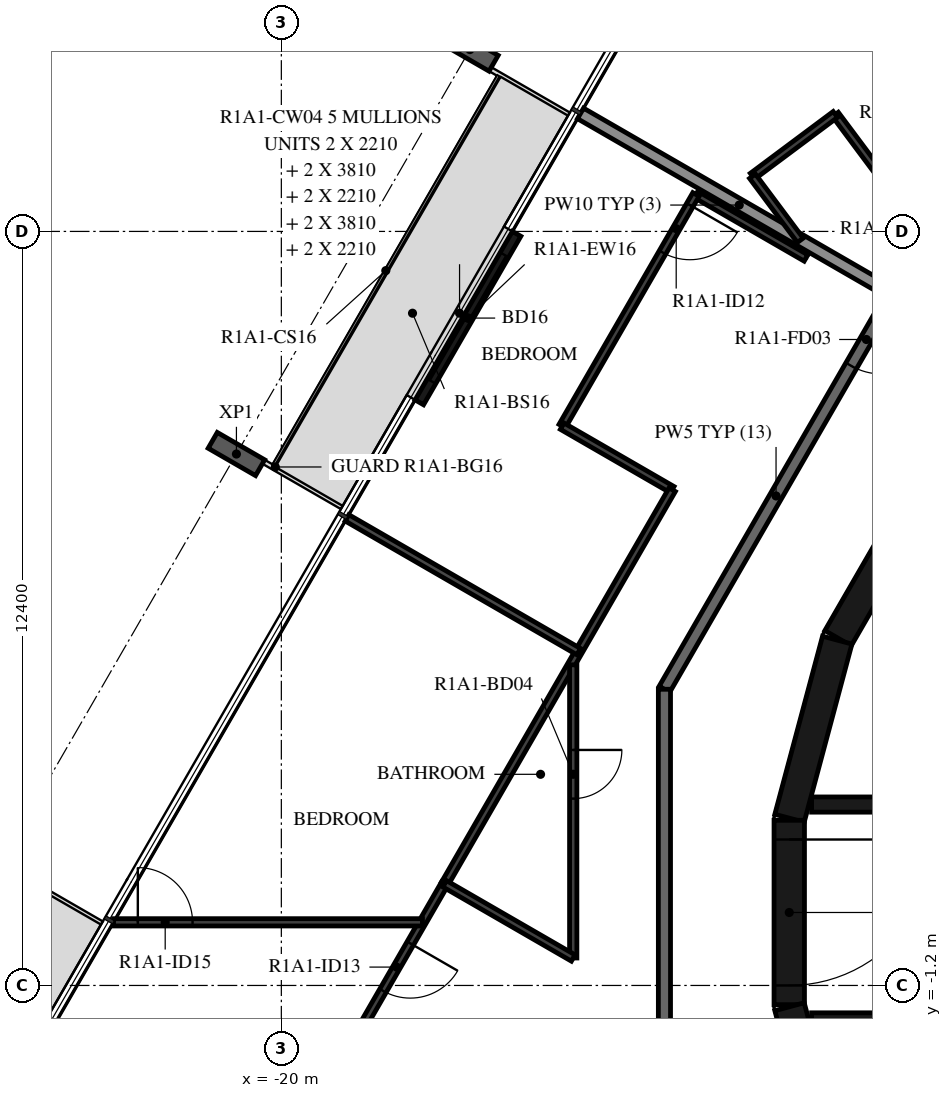
"""IFC4 building model, lengths in metres.
Left out: names, types, materials, properties, quantities, classifications, styles, units other than length and angle.
Written with IfcOpenShell. Run it as: python <this file> out.ifc"""

import sys

from ifc_helpers import new_model, si_unit, direction, frame, frame_2d, origin, origin_2d, place, context, subcontext, project, spatial, rectangle, i_section, extrude, element, fill, save


model = new_model("IFC4")
c1 = context("Model", 3, precision=1e-05, world=origin(), true_north=direction((0.0, 1.0)))
c2 = subcontext(c1, "Body", "Model", "MODEL_VIEW")
j1 = project(units=[si_unit("LENGTHUNIT", "METRE"), si_unit("PLANEANGLEUNIT", "RADIAN")], contexts=[c1])
p1 = place(None, origin())
s1 = spatial("IfcSite", under=j1, at=p1, CompositionType="ELEMENT")
p2 = place(p1, origin())
s2 = spatial("IfcBuilding", under=s1, at=p2, CompositionType="ELEMENT")
p3 = place(p2, frame((0.0, 0.0, 41.9)))
s3 = spatial("IfcBuildingStorey", under=s2, at=p3, CompositionType="ELEMENT", Elevation=41.9)
for number, where, z_axis, x_axis in (
    (1, (-16.899, 14.19, -0.38), (0.0, 0.0, 1.0), (0.5, 0.866, 0.0)),
    (2, (-20.739, 7.539, -0.38), (0.0, 0.0, 1.0), (0.5, 0.866, 0.0)),
):
    element("IfcColumn", number, at=place(p3, frame(where, z_axis=z_axis, x_axis=x_axis)), inside=s3, PredefinedType="COLUMN", context=c2, shape_type="SweptSolid", body=[
        extrude(i_section(OverallWidth=0.3, OverallDepth=0.9, WebThickness=0.019, FlangeThickness=0.035, FilletRadius=0.03, at=origin_2d()), origin(), (0.0, 0.0, 1.0), 3.5),
    ])
p4 = place(p3, frame((-16.131, 11.161, 0.0), z_axis=(0.0, 0.0, 1.0), x_axis=(-0.500028443584, -0.866008981251, 0.0)))
e3 = element("IfcWall", 3, at=p4, inside=s3, PredefinedType="STANDARD", context=c2, shape_type="SweptSolid", body=[
    extrude(rectangle(XDim=3.2, YDim=0.16, at=frame_2d((1.6, 0.0))), origin(), (0.0, 0.0, 1.0), 3.12),
])
p5 = place(p4, frame((0.4, 0.0, 0.0)))
e4 = element("IfcOpeningElement", 4, at=p5, cuts=e3, PredefinedType="OPENING", context=c2, shape_type="SweptSolid", body=[
    extrude(rectangle(XDim=2.4, YDim=2.4, at=frame_2d((1.2, 1.2))), frame((0.0, 0.09, 0.0), z_axis=(0.0, -1.0, 0.0), x_axis=(1.0, 0.0, 0.0)), (0.0, 0.0, 1.0), 0.18),
])
for number, where, z_axis, x_axis in (
    (5, (-9.329, 7.137, 0.0), (0.0, 0.0, 1.0), (-0.5, -0.866, 0.0)),
    (6, (-10.858, 4.479, 0.0), (0.0, 0.0, 1.0), (-0.259, -0.966, 0.0)),
):
    element("IfcWall", number, at=place(p3, frame(where, z_axis=z_axis, x_axis=x_axis)), inside=s3, PredefinedType="SHEAR", context=c2, shape_type="SweptSolid", body=[
        extrude(rectangle(XDim=3.033, YDim=0.5, at=frame_2d((1.516, 0.0))), origin(), (0.0, 0.0, 1.0), 3.12),
    ])
p6 = place(p3, frame((-11.647, 1.516, 0.0), z_axis=(0.0, 0.0, 1.0), x_axis=(0.0, -1.0, 0.0)))
e7 = element("IfcWall", 7, at=p6, inside=s3, PredefinedType="SHEAR", context=c2, shape_type="SweptSolid", body=[
    extrude(rectangle(XDim=3.033, YDim=0.5, at=frame_2d((1.516, 0.0))), origin(), (0.0, 0.0, 1.0), 3.12),
])
p7 = place(p6, frame((0.316, 0.0, 0.0)))
e8 = element("IfcOpeningElement", 8, at=p7, cuts=e7, PredefinedType="OPENING", context=c2, shape_type="SweptSolid", body=[
    extrude(rectangle(XDim=2.4, YDim=2.1, at=frame_2d((1.2, 1.05))), frame((0.0, 0.26, 0.0), z_axis=(0.0, -1.0, 0.0), x_axis=(1.0, 0.0, 0.0)), (0.0, 0.0, 1.0), 0.52),
])
p8 = place(p3, frame((-11.643, -1.55, 0.0), z_axis=(0.0, 0.0, 1.0), x_axis=(0.258734743916, -0.965948410781, 0.0)))
e9 = element("IfcWall", 9, at=p8, inside=s3, PredefinedType="SHEAR", context=c2, shape_type="SweptSolid", body=[
    extrude(rectangle(XDim=3.033, YDim=0.5, at=frame_2d((1.516, 0.0))), origin(), (0.0, 0.0, 1.0), 3.12),
])
p9 = place(p8, frame((1.066, 0.0, 0.0)))
e10 = element("IfcOpeningElement", 10, at=p9, cuts=e9, PredefinedType="OPENING", context=c2, shape_type="SweptSolid", body=[
    extrude(rectangle(XDim=0.9, YDim=2.1, at=frame_2d((0.45, 1.05))), frame((0.0, 0.26, 0.0), z_axis=(0.0, -1.0, 0.0), x_axis=(1.0, 0.0, 0.0)), (0.0, 0.0, 1.0), 0.52),
])
p10 = place(p3, frame((-11.28, 1.775, 0.0), z_axis=(0.0, 0.0, 1.0), x_axis=(1.0, 0.0, 0.0)))
e11 = element("IfcWall", 11, at=p10, inside=s3, PredefinedType="SHEAR", context=c2, shape_type="SweptSolid", body=[
    extrude(rectangle(XDim=14.38, YDim=0.25, at=frame_2d((7.19, 0.0))), origin(), (0.0, 0.0, 1.0), 3.12),
])
p11 = place(p10, frame((2.13, 0.0, 0.0)))
e12 = element("IfcOpeningElement", 12, at=p11, cuts=e11, PredefinedType="OPENING", context=c2, shape_type="SweptSolid", body=[
    extrude(rectangle(XDim=1.1, YDim=2.1, at=frame_2d((0.55, 1.05))), frame((0.0, 0.135, 0.0), z_axis=(0.0, -1.0, 0.0), x_axis=(1.0, 0.0, 0.0)), (0.0, 0.0, 1.0), 0.27),
])
p12 = place(p10, frame((4.28, 0.0, 0.0)))
e13 = element("IfcOpeningElement", 13, at=p12, cuts=e11, PredefinedType="OPENING", context=c2, shape_type="SweptSolid", body=[
    extrude(rectangle(XDim=1.1, YDim=2.1, at=frame_2d((0.55, 1.05))), frame((0.0, 0.135, 0.0), z_axis=(0.0, -1.0, 0.0), x_axis=(1.0, 0.0, 0.0)), (0.0, 0.0, 1.0), 0.27),
])
p13 = place(p10, frame((6.43, 0.0, 0.0)))
e14 = element("IfcOpeningElement", 14, at=p13, cuts=e11, PredefinedType="OPENING", context=c2, shape_type="SweptSolid", body=[
    extrude(rectangle(XDim=1.1, YDim=2.1, at=frame_2d((0.55, 1.05))), frame((0.0, 0.135, 0.0), z_axis=(0.0, -1.0, 0.0), x_axis=(1.0, 0.0, 0.0)), (0.0, 0.0, 1.0), 0.27),
])
p14 = place(p10, frame((8.58, 0.0, 0.0)))
e15 = element("IfcOpeningElement", 15, at=p14, cuts=e11, PredefinedType="OPENING", context=c2, shape_type="SweptSolid", body=[
    extrude(rectangle(XDim=1.1, YDim=2.1, at=frame_2d((0.55, 1.05))), frame((0.0, 0.135, 0.0), z_axis=(0.0, -1.0, 0.0), x_axis=(1.0, 0.0, 0.0)), (0.0, 0.0, 1.0), 0.27),
])
p15 = place(p10, frame((10.83, 0.0, 0.0)))
e16 = element("IfcOpeningElement", 16, at=p15, cuts=e11, PredefinedType="OPENING", context=c2, shape_type="SweptSolid", body=[
    extrude(rectangle(XDim=0.9, YDim=2.1, at=frame_2d((0.45, 1.05))), frame((0.0, 0.135, 0.0), z_axis=(0.0, -1.0, 0.0), x_axis=(1.0, 0.0, 0.0)), (0.0, 0.0, 1.0), 0.27),
])
p16 = place(p10, frame((12.98, 0.0, 0.0)))
e17 = element("IfcOpeningElement", 17, at=p16, cuts=e11, PredefinedType="OPENING", context=c2, shape_type="SweptSolid", body=[
    extrude(rectangle(XDim=0.9, YDim=2.1, at=frame_2d((0.45, 1.05))), frame((0.0, 0.135, 0.0), z_axis=(0.0, -1.0, 0.0), x_axis=(1.0, 0.0, 0.0)), (0.0, 0.0, 1.0), 0.27),
])
p17 = place(p3, frame((-11.28, -1.775, 0.0), z_axis=(0.0, 0.0, 1.0), x_axis=(1.0, 0.0, 0.0)))
e18 = element("IfcWall", 18, at=p17, inside=s3, PredefinedType="SHEAR", context=c2, shape_type="SweptSolid", body=[
    extrude(rectangle(XDim=14.38, YDim=0.25, at=frame_2d((7.19, 0.0))), origin(), (0.0, 0.0, 1.0), 3.12),
])
p18 = place(p17, frame((9.755, 0.0, 0.0)))
e19 = element("IfcOpeningElement", 19, at=p18, cuts=e18, PredefinedType="OPENING", context=c2, shape_type="SweptSolid", body=[
    extrude(rectangle(XDim=0.9, YDim=2.1, at=frame_2d((0.45, 1.05))), frame((0.0, 0.135, 0.0), z_axis=(0.0, -1.0, 0.0), x_axis=(1.0, 0.0, 0.0)), (0.0, 0.0, 1.0), 0.27),
])
p19 = place(p3, frame((-10.029, 10.029, 0.0), z_axis=(0.0, 0.0, 1.0), x_axis=(-0.500001669485, -0.866024439905, 0.0)))
e20 = element("IfcWall", 20, at=p19, inside=s3, PredefinedType="STANDARD", context=c2, shape_type="SweptSolid", body=[
    extrude(rectangle(XDim=7.342, YDim=0.2, at=frame_2d((3.671, 0.0))), origin(), (0.0, 0.0, 1.0), 3.12),
])
p20 = place(p19, frame((0.2, 0.0, 0.0)))
e21 = element("IfcOpeningElement", 21, at=p20, cuts=e20, PredefinedType="OPENING", context=c2, shape_type="SweptSolid", body=[
    extrude(rectangle(XDim=1.0, YDim=2.1, at=frame_2d((0.5, 1.05))), frame((0.0, 0.11, 0.0), z_axis=(0.0, -1.0, 0.0), x_axis=(1.0, 0.0, 0.0)), (0.0, 0.0, 1.0), 0.22),
])
p21 = place(p3, frame((-13.7, 3.671, 0.0), z_axis=(0.0, 0.0, 1.0), x_axis=(0.0, -1.0, 0.0)))
e22 = element("IfcWall", 22, at=p21, inside=s3, PredefinedType="STANDARD", context=c2, shape_type="SweptSolid", body=[
    extrude(rectangle(XDim=7.342, YDim=0.2, at=frame_2d((3.671, 0.0))), origin(), (0.0, 0.0, 1.0), 3.12),
])
p22 = place(p3, frame((-15.08, 13.14, 0.0), z_axis=(0.0, 0.0, 1.0), x_axis=(0.86603112331, -0.49999009336, 0.0)))
e23 = element("IfcWall", 23, at=p22, inside=s3, PredefinedType="STANDARD", context=c2, shape_type="SweptSolid", body=[
    extrude(rectangle(XDim=6.027, YDim=0.2, at=frame_2d((3.014, 0.0))), origin(), (0.0, 0.0, 1.0), 2.73),
])
p23 = place(p3, frame((-9.92, 11.824, 0.0), z_axis=(0.0, 0.0, 1.0), x_axis=(-0.597853402964, 0.801605456921, 0.0)))
e24 = element("IfcWall", 24, at=p23, inside=s3, PredefinedType="PARTITIONING", context=c2, shape_type="SweptSolid", body=[
    extrude(rectangle(XDim=1.621, YDim=0.12, at=frame_2d((0.811, 0.0))), origin(), (0.0, 0.0, 1.0), 3.12),
])
p24 = place(p3, frame((-10.889, 13.124, 0.0), z_axis=(0.0, 0.0, 1.0), x_axis=(-0.801616976804, -0.597837956724, 0.0)))
e25 = element("IfcWall", 25, at=p24, inside=s3, PredefinedType="PARTITIONING", context=c2, shape_type="SweptSolid", body=[
    extrude(rectangle(XDim=1.7, YDim=0.12, at=frame_2d((0.85, 0.0))), origin(), (0.0, 0.0, 1.0), 3.12),
])
p25 = place(p3, frame((-12.252, 12.107, 0.0), z_axis=(0.0, 0.0, 1.0), x_axis=(0.597827926538, -0.801624457119, 0.0)))
e26 = element("IfcWall", 26, at=p25, inside=s3, PredefinedType="PARTITIONING", context=c2, shape_type="SweptSolid", body=[
    extrude(rectangle(XDim=1.314, YDim=0.12, at=frame_2d((0.657, 0.0))), origin(), (0.0, 0.0, 1.0), 3.12),
])
p26 = place(p3, frame((-11.372, 10.763, 0.0), z_axis=(0.0, 0.0, 1.0), x_axis=(-0.866041603473, 0.499971940267, 0.0)))
e27 = element("IfcWall", 27, at=p26, inside=s3, PredefinedType="PARTITIONING", context=c2, shape_type="SweptSolid", body=[
    extrude(rectangle(XDim=2.089, YDim=0.12, at=frame_2d((1.045, 0.0))), origin(), (0.0, 0.0, 1.0), 3.12),
])
p27 = place(p3, frame((-13.181, 11.808, 0.0), z_axis=(0.0, 0.0, 1.0), x_axis=(-0.50002983664, -0.866008176907, 0.0)))
e28 = element("IfcWall", 28, at=p27, inside=s3, PredefinedType="PARTITIONING", context=c2, shape_type="SweptSolid", body=[
    extrude(rectangle(XDim=4.4, YDim=0.12, at=frame_2d((2.2, 0.0))), origin(), (0.0, 0.0, 1.0), 3.12),
])
p28 = place(p27, frame((0.2, 0.0, 0.0)))
e29 = element("IfcOpeningElement", 29, at=p28, cuts=e28, PredefinedType="OPENING", context=c2, shape_type="SweptSolid", body=[
    extrude(rectangle(XDim=0.9, YDim=2.1, at=frame_2d((0.45, 1.05))), frame((0.0, 0.07, 0.0), z_axis=(0.0, -1.0, 0.0), x_axis=(1.0, 0.0, 0.0)), (0.0, 0.0, 1.0), 0.14),
])
p29 = place(p3, frame((-15.382, 7.997, 0.0), z_axis=(0.0, 0.0, 1.0), x_axis=(0.866041603473, -0.499971940267, 0.0)))
e30 = element("IfcWall", 30, at=p29, inside=s3, PredefinedType="PARTITIONING", context=c2, shape_type="SweptSolid", body=[
    extrude(rectangle(XDim=2.089, YDim=0.12, at=frame_2d((1.045, 0.0))), origin(), (0.0, 0.0, 1.0), 3.12),
])
p30 = place(p3, frame((-13.572, 6.953, 0.0), z_axis=(0.0, 0.0, 1.0), x_axis=(-0.499981332661, -0.866036181109, 0.0)))
e31 = element("IfcWall", 31, at=p30, inside=s3, PredefinedType="PARTITIONING", context=c2, shape_type="SweptSolid", body=[
    extrude(rectangle(XDim=7.483, YDim=0.12, at=frame_2d((3.742, 0.0))), origin(), (0.0, 0.0, 1.0), 3.12),
])
p31 = place(p3, frame((-17.313, 0.472, 0.0), z_axis=(0.0, 0.0, 1.0), x_axis=(-0.499999047218, -0.866025953873, 0.0)))
e32 = element("IfcWall", 32, at=p31, inside=s3, PredefinedType="PARTITIONING", context=c2, shape_type="SweptSolid", body=[
    extrude(rectangle(XDim=11.639, YDim=0.12, at=frame_2d((5.82, 0.0))), origin(), (0.0, 0.0, 1.0), 3.12),
])
p32 = place(p31, frame((1.132, 0.0, 0.0)))
e33 = element("IfcOpeningElement", 33, at=p32, cuts=e32, PredefinedType="OPENING", context=c2, shape_type="SweptSolid", body=[
    extrude(rectangle(XDim=0.9, YDim=2.1, at=frame_2d((0.45, 1.05))), frame((0.0, 0.07, 0.0), z_axis=(0.0, -1.0, 0.0), x_axis=(1.0, 0.0, 0.0)), (0.0, 0.0, 1.0), 0.14),
])
p33 = place(p31, frame((8.083, 0.0, 0.0)))
e34 = element("IfcOpeningElement", 34, at=p33, cuts=e32, PredefinedType="OPENING", context=c2, shape_type="SweptSolid", body=[
    extrude(rectangle(XDim=0.9, YDim=2.1, at=frame_2d((0.45, 1.05))), frame((0.0, 0.07, 0.0), z_axis=(0.0, -1.0, 0.0), x_axis=(1.0, 0.0, 0.0)), (0.0, 0.0, 1.0), 0.14),
])
p34 = place(p3, frame((-15.2, 4.073, 0.0), z_axis=(0.0, 0.0, 1.0), x_axis=(0.0, -1.0, 0.0)))
e35 = element("IfcWall", 35, at=p34, inside=s3, PredefinedType="PARTITIONING", context=c2, shape_type="SweptSolid", body=[
    extrude(rectangle(XDim=4.821, YDim=0.12, at=frame_2d((2.411, 0.0))), origin(), (0.0, 0.0, 1.0), 3.12),
])
p35 = place(p34, frame((1.4, 0.0, 0.0)))
e36 = element("IfcOpeningElement", 36, at=p35, cuts=e35, PredefinedType="OPENING", context=c2, shape_type="SweptSolid", body=[
    extrude(rectangle(XDim=0.8, YDim=2.1, at=frame_2d((0.4, 1.05))), frame((0.0, 0.07, 0.0), z_axis=(0.0, -1.0, 0.0), x_axis=(1.0, 0.0, 0.0)), (0.0, 0.0, 1.0), 0.14),
])
p36 = place(p3, frame((-15.2, -0.748, 0.0), z_axis=(0.0, 0.0, 1.0), x_axis=(-0.866030657337, 0.49999090047, 0.0)))
e37 = element("IfcWall", 37, at=p36, inside=s3, PredefinedType="PARTITIONING", context=c2, shape_type="SweptSolid", body=[
    extrude(rectangle(XDim=2.44, YDim=0.12, at=frame_2d((1.22, 0.0))), origin(), (0.0, 0.0, 1.0), 3.12),
])
p37 = place(p3, frame((-18.92, 6.49, 0.0), z_axis=(0.0, 0.0, 1.0), x_axis=(0.865994303029, -0.500053864221, 0.0)))
e38 = element("IfcWall", 38, at=p37, inside=s3, PredefinedType="PARTITIONING", context=c2, shape_type="SweptSolid", body=[
    extrude(rectangle(XDim=4.4, YDim=0.12, at=frame_2d((2.2, 0.0))), origin(), (0.0, 0.0, 1.0), 2.73),
])
p38 = place(p3, frame((-22.76, -0.162, 0.0), z_axis=(0.0, 0.0, 1.0), x_axis=(1.0, 0.0, 0.0)))
e39 = element("IfcWall", 39, at=p38, inside=s3, PredefinedType="PARTITIONING", context=c2, shape_type="SweptSolid", body=[
    extrude(rectangle(XDim=5.081, YDim=0.12, at=frame_2d((2.54, 0.0))), origin(), (0.0, 0.0, 1.0), 3.12),
])
p39 = place(p38, frame((0.4, 0.0, 0.0)))
e40 = element("IfcOpeningElement", 40, at=p39, cuts=e39, PredefinedType="OPENING", context=c2, shape_type="SweptSolid", body=[
    extrude(rectangle(XDim=0.9, YDim=2.1, at=frame_2d((0.45, 1.05))), frame((0.0, 0.07, 0.0), z_axis=(0.0, -1.0, 0.0), x_axis=(1.0, 0.0, 0.0)), (0.0, 0.0, 1.0), 0.14),
])
p40 = place(p5, origin())
e41 = element("IfcDoor", 41, at=p40, inside=s3, OperationType="DOUBLE_DOOR_SLIDING", PredefinedType="DOOR", context=c2, shape_type="SweptSolid", body=[
    extrude(rectangle(XDim=2.4, YDim=2.4, at=frame_2d((1.2, 1.2))), frame((0.0, 0.025, 0.0), z_axis=(0.0, -1.0, 0.0), x_axis=(1.0, 0.0, 0.0)), (0.0, 0.0, 1.0), 0.05),
])
fill(e4, e41)
p41 = place(p7, origin())
e42 = element("IfcDoor", 42, at=p41, inside=s3, OperationType="DOUBLE_DOOR_SINGLE_SWING", PredefinedType="DOOR", context=c2, shape_type="SweptSolid", body=[
    extrude(rectangle(XDim=2.4, YDim=2.1, at=frame_2d((1.2, 1.05))), frame((0.0, 0.025, 0.0), z_axis=(0.0, -1.0, 0.0), x_axis=(1.0, 0.0, 0.0)), (0.0, 0.0, 1.0), 0.05),
])
fill(e8, e42)
p42 = place(p20, origin())
e43 = element("IfcDoor", 43, at=p42, inside=s3, OperationType="SINGLE_SWING_LEFT", PredefinedType="DOOR", context=c2, shape_type="SweptSolid", body=[
    extrude(rectangle(XDim=1.0, YDim=2.1, at=frame_2d((0.5, 1.05))), frame((0.0, 0.025, 0.0), z_axis=(0.0, -1.0, 0.0), x_axis=(1.0, 0.0, 0.0)), (0.0, 0.0, 1.0), 0.05),
])
fill(e21, e43)
p43 = place(p28, origin())
e44 = element("IfcDoor", 44, at=p43, inside=s3, OperationType="SINGLE_SWING_LEFT", PredefinedType="DOOR", context=c2, shape_type="SweptSolid", body=[
    extrude(rectangle(XDim=0.9, YDim=2.1, at=frame_2d((0.45, 1.05))), frame((0.0, 0.025, 0.0), z_axis=(0.0, -1.0, 0.0), x_axis=(1.0, 0.0, 0.0)), (0.0, 0.0, 1.0), 0.05),
])
fill(e29, e44)
p44 = place(p35, origin())
e45 = element("IfcDoor", 45, at=p44, inside=s3, OperationType="SINGLE_SWING_RIGHT", PredefinedType="DOOR", context=c2, shape_type="SweptSolid", body=[
    extrude(rectangle(XDim=0.8, YDim=2.1, at=frame_2d((0.4, 1.05))), frame((0.0, 0.025, 0.0), z_axis=(0.0, -1.0, 0.0), x_axis=(1.0, 0.0, 0.0)), (0.0, 0.0, 1.0), 0.05),
])
fill(e36, e45)
p45 = place(p32, origin())
e46 = element("IfcDoor", 46, at=p45, inside=s3, OperationType="SINGLE_SWING_RIGHT", PredefinedType="DOOR", context=c2, shape_type="SweptSolid", body=[
    extrude(rectangle(XDim=0.9, YDim=2.1, at=frame_2d((0.45, 1.05))), frame((0.0, 0.025, 0.0), z_axis=(0.0, -1.0, 0.0), x_axis=(1.0, 0.0, 0.0)), (0.0, 0.0, 1.0), 0.05),
])
fill(e33, e46)
p46 = place(p39, origin())
e47 = element("IfcDoor", 47, at=p46, inside=s3, OperationType="SINGLE_SWING_LEFT", PredefinedType="DOOR", context=c2, shape_type="SweptSolid", body=[
    extrude(rectangle(XDim=0.9, YDim=2.1, at=frame_2d((0.45, 1.05))), frame((0.0, 0.025, 0.0), z_axis=(0.0, -1.0, 0.0), x_axis=(1.0, 0.0, 0.0)), (0.0, 0.0, 1.0), 0.05),
])
fill(e40, e47)
save(model, sys.argv[1])
